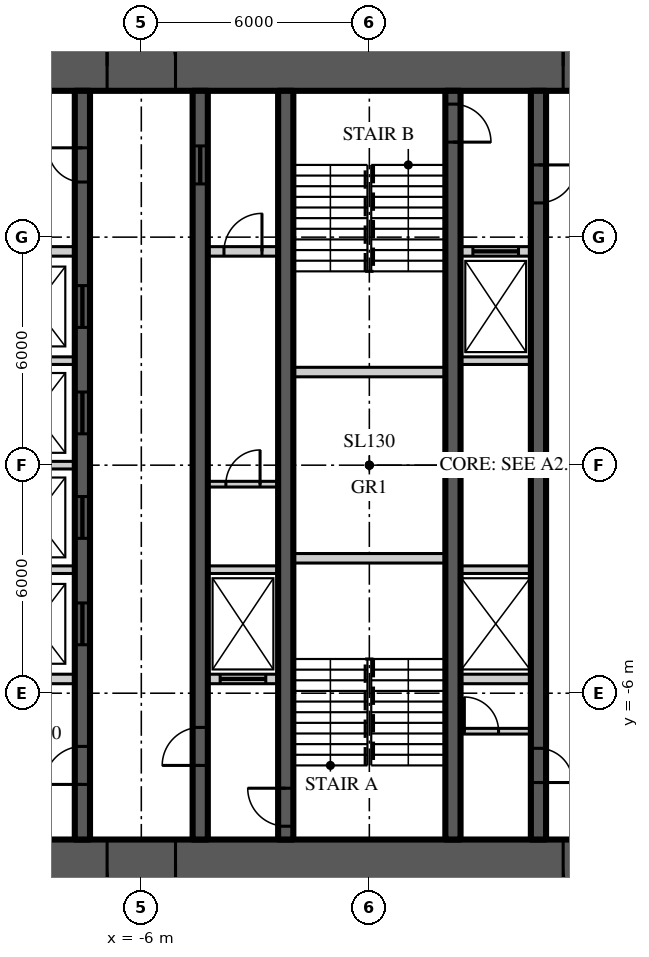
"""IFC4 building model, lengths in metres.
Left out: names, types, materials, properties, quantities, classifications, styles, units other than length and angle.
Written with IfcOpenShell. Run it as: python <this file> out.ifc"""

import sys

from ifc_helpers import new_model, si_unit, direction, frame, frame_2d, origin, place, context, subcontext, project, spatial, rectangle, extrude, element, fill, save


model = new_model("IFC4")
c1 = context("Model", 3, precision=1e-05, world=origin(), true_north=direction((0.0, 1.0)))
c2 = subcontext(c1, "Body", "Model", "MODEL_VIEW")
j1 = project(units=[si_unit("LENGTHUNIT", "METRE"), si_unit("PLANEANGLEUNIT", "RADIAN")], contexts=[c1])
p1 = place(None, origin())
s1 = spatial("IfcSite", under=j1, at=p1, CompositionType="ELEMENT")
p2 = place(p1, origin())
s2 = spatial("IfcBuilding", under=s1, at=p2, CompositionType="ELEMENT")
p3 = place(p2, frame((0.0, 0.0, 98.1)))
s3 = spatial("IfcBuildingStorey", under=s2, at=p3, CompositionType="ELEMENT", Elevation=98.1)
p4 = place(p3, frame((-11.15, 10.5, 0.0), z_axis=(0.0, 0.0, 1.0), x_axis=(1.0, 0.0, 0.0)))
e1 = element("IfcWall", 1, at=p4, inside=s3, PredefinedType="SHEAR", context=c2, shape_type="SweptSolid", body=[
    extrude(rectangle(XDim=22.3, YDim=1.3, at=frame_2d((11.15, 0.0))), origin(), (0.0, 0.0, 1.0), 3.9),
])
p5 = place(p4, frame((4.25, 0.0, 0.0)))
e2 = element("IfcOpeningElement", 2, at=p5, cuts=e1, PredefinedType="OPENING", context=c2, shape_type="SweptSolid", body=[
    extrude(rectangle(XDim=1.8, YDim=2.2, at=frame_2d((0.9, 1.1))), frame((0.0, 0.66, 0.0), z_axis=(0.0, -1.0, 0.0), x_axis=(1.0, 0.0, 0.0)), (0.0, 0.0, 1.0), 1.32),
])
p6 = place(p4, frame((16.25, 0.0, 0.0)))
e3 = element("IfcOpeningElement", 3, at=p6, cuts=e1, PredefinedType="OPENING", context=c2, shape_type="SweptSolid", body=[
    extrude(rectangle(XDim=1.8, YDim=2.2, at=frame_2d((0.9, 1.1))), frame((0.0, 0.66, 0.0), z_axis=(0.0, -1.0, 0.0), x_axis=(1.0, 0.0, 0.0)), (0.0, 0.0, 1.0), 1.32),
])
p7 = place(p3, frame((11.15, -10.5, 0.0), z_axis=(0.0, 0.0, 1.0), x_axis=(-1.0, 0.0, 0.0)))
e4 = element("IfcWall", 4, at=p7, inside=s3, PredefinedType="SHEAR", context=c2, shape_type="SweptSolid", body=[
    extrude(rectangle(XDim=22.3, YDim=1.3, at=frame_2d((11.15, 0.0))), origin(), (0.0, 0.0, 1.0), 3.9),
])
p8 = place(p7, frame((16.25, 0.0, 0.0)))
e5 = element("IfcOpeningElement", 5, at=p8, cuts=e4, PredefinedType="OPENING", context=c2, shape_type="SweptSolid", body=[
    extrude(rectangle(XDim=1.8, YDim=2.2, at=frame_2d((0.9, 1.1))), frame((0.0, 0.66, 0.0), z_axis=(0.0, -1.0, 0.0), x_axis=(1.0, 0.0, 0.0)), (0.0, 0.0, 1.0), 1.32),
])
p9 = place(p7, frame((4.25, 0.0, 0.0)))
e6 = element("IfcOpeningElement", 6, at=p9, cuts=e4, PredefinedType="OPENING", context=c2, shape_type="SweptSolid", body=[
    extrude(rectangle(XDim=1.8, YDim=2.2, at=frame_2d((0.9, 1.1))), frame((0.0, 0.66, 0.0), z_axis=(0.0, -1.0, 0.0), x_axis=(1.0, 0.0, 0.0)), (0.0, 0.0, 1.0), 1.32),
])
p10 = place(p3, frame((-7.55, -9.85, 0.0), z_axis=(0.0, 0.0, 1.0), x_axis=(0.0, 1.0, 0.0)))
e7 = element("IfcWall", 7, at=p10, inside=s3, PredefinedType="SHEAR", context=c2, shape_type="SweptSolid", body=[
    extrude(rectangle(XDim=19.7, YDim=0.4, at=frame_2d((9.85, 0.0))), origin(), (0.0, 0.0, 1.0), 3.9),
])
p11 = place(p10, frame((1.45, 0.0, 0.0)))
e8 = element("IfcOpeningElement", 8, at=p11, cuts=e7, PredefinedType="OPENING", context=c2, shape_type="SweptSolid", body=[
    extrude(rectangle(XDim=1.0, YDim=2.2, at=frame_2d((0.5, 1.1))), frame((0.0, 0.21, 0.0), z_axis=(0.0, -1.0, 0.0), x_axis=(1.0, 0.0, 0.0)), (0.0, 0.0, 1.0), 0.42),
])
p12 = place(p10, frame((17.3, 0.0, 0.0)))
e9 = element("IfcOpeningElement", 9, at=p12, cuts=e7, PredefinedType="OPENING", context=c2, shape_type="SweptSolid", body=[
    extrude(rectangle(XDim=0.9, YDim=2.1, at=frame_2d((0.45, 1.05))), frame((0.0, 0.21, 0.0), z_axis=(0.0, -1.0, 0.0), x_axis=(1.0, 0.0, 0.0)), (0.0, 0.0, 1.0), 0.42),
])
p13 = place(p10, frame((5.125, 0.0, 0.0)))
e10 = element("IfcOpeningElement", 10, at=p13, cuts=e7, PredefinedType="OPENING", context=c2, shape_type="SweptSolid", body=[
    extrude(rectangle(XDim=1.1, YDim=2.2, at=frame_2d((0.55, 1.1))), frame((0.0, 0.21, 0.0), z_axis=(0.0, -1.0, 0.0), x_axis=(1.0, 0.0, 0.0)), (0.0, 0.0, 1.0), 0.42),
])
p14 = place(p10, frame((7.925, 0.0, 0.0)))
e11 = element("IfcOpeningElement", 11, at=p14, cuts=e7, PredefinedType="OPENING", context=c2, shape_type="SweptSolid", body=[
    extrude(rectangle(XDim=1.1, YDim=2.2, at=frame_2d((0.55, 1.1))), frame((0.0, 0.21, 0.0), z_axis=(0.0, -1.0, 0.0), x_axis=(1.0, 0.0, 0.0)), (0.0, 0.0, 1.0), 0.42),
])
p15 = place(p10, frame((10.675, 0.0, 0.0)))
e12 = element("IfcOpeningElement", 12, at=p15, cuts=e7, PredefinedType="OPENING", context=c2, shape_type="SweptSolid", body=[
    extrude(rectangle(XDim=1.1, YDim=2.2, at=frame_2d((0.55, 1.1))), frame((0.0, 0.21, 0.0), z_axis=(0.0, -1.0, 0.0), x_axis=(1.0, 0.0, 0.0)), (0.0, 0.0, 1.0), 0.42),
])
p16 = place(p10, frame((13.475, 0.0, 0.0)))
e13 = element("IfcOpeningElement", 13, at=p16, cuts=e7, PredefinedType="OPENING", context=c2, shape_type="SweptSolid", body=[
    extrude(rectangle(XDim=1.1, YDim=2.2, at=frame_2d((0.55, 1.1))), frame((0.0, 0.21, 0.0), z_axis=(0.0, -1.0, 0.0), x_axis=(1.0, 0.0, 0.0)), (0.0, 0.0, 1.0), 0.42),
])
p17 = place(p3, frame((-4.45, -9.85, 0.0), z_axis=(0.0, 0.0, 1.0), x_axis=(0.0, 1.0, 0.0)))
e14 = element("IfcWall", 14, at=p17, inside=s3, PredefinedType="SHEAR", context=c2, shape_type="SweptSolid", body=[
    extrude(rectangle(XDim=19.7, YDim=0.4, at=frame_2d((9.85, 0.0))), origin(), (0.0, 0.0, 1.0), 3.9),
])
p18 = place(p17, frame((1.95, 0.0, 0.0)))
e15 = element("IfcOpeningElement", 15, at=p18, cuts=e14, PredefinedType="OPENING", context=c2, shape_type="SweptSolid", body=[
    extrude(rectangle(XDim=1.0, YDim=2.2, at=frame_2d((0.5, 1.1))), frame((0.0, 0.21, 0.0), z_axis=(0.0, -1.0, 0.0), x_axis=(1.0, 0.0, 0.0)), (0.0, 0.0, 1.0), 0.42),
])
p19 = place(p17, frame((17.25, 0.0, 0.0)))
e16 = element("IfcOpeningElement", 16, at=p19, cuts=e14, PredefinedType="OPENING", context=c2, shape_type="SweptSolid", body=[
    extrude(rectangle(XDim=1.0, YDim=2.1, at=frame_2d((0.5, 1.05))), frame((0.0, 0.21, 0.0), z_axis=(0.0, -1.0, 0.0), x_axis=(1.0, 0.0, 0.0)), (0.0, 0.0, 1.0), 0.42),
])
p20 = place(p3, frame((4.45, 9.85, 0.0), z_axis=(0.0, 0.0, 1.0), x_axis=(0.0, -1.0, 0.0)))
e17 = element("IfcWall", 17, at=p20, inside=s3, PredefinedType="SHEAR", context=c2, shape_type="SweptSolid", body=[
    extrude(rectangle(XDim=19.7, YDim=0.4, at=frame_2d((9.85, 0.0))), origin(), (0.0, 0.0, 1.0), 3.9),
])
p21 = place(p20, frame((1.95, 0.0, 0.0)))
e18 = element("IfcOpeningElement", 18, at=p21, cuts=e17, PredefinedType="OPENING", context=c2, shape_type="SweptSolid", body=[
    extrude(rectangle(XDim=1.0, YDim=2.2, at=frame_2d((0.5, 1.1))), frame((0.0, 0.21, 0.0), z_axis=(0.0, -1.0, 0.0), x_axis=(1.0, 0.0, 0.0)), (0.0, 0.0, 1.0), 0.42),
])
p22 = place(p20, frame((17.3, 0.0, 0.0)))
e19 = element("IfcOpeningElement", 19, at=p22, cuts=e17, PredefinedType="OPENING", context=c2, shape_type="SweptSolid", body=[
    extrude(rectangle(XDim=0.9, YDim=2.1, at=frame_2d((0.45, 1.05))), frame((0.0, 0.21, 0.0), z_axis=(0.0, -1.0, 0.0), x_axis=(1.0, 0.0, 0.0)), (0.0, 0.0, 1.0), 0.42),
])
p23 = place(p3, frame((-2.2, -9.85, 0.0), z_axis=(0.0, 0.0, 1.0), x_axis=(0.0, 1.0, 0.0)))
e20 = element("IfcWall", 20, at=p23, inside=s3, PredefinedType="SHEAR", context=c2, shape_type="SweptSolid", body=[
    extrude(rectangle(XDim=19.7, YDim=0.4, at=frame_2d((9.85, 0.0))), origin(), (0.0, 0.0, 1.0), 3.9),
])
p24 = place(p23, frame((0.35, 0.0, 0.0)))
e21 = element("IfcOpeningElement", 21, at=p24, cuts=e20, PredefinedType="OPENING", context=c2, shape_type="SweptSolid", body=[
    extrude(rectangle(XDim=1.0, YDim=2.2, at=frame_2d((0.5, 1.1))), frame((0.0, 0.21, 0.0), z_axis=(0.0, -1.0, 0.0), x_axis=(1.0, 0.0, 0.0)), (0.0, 0.0, 1.0), 0.42),
])
p25 = place(p3, frame((2.2, 9.85, 0.0), z_axis=(0.0, 0.0, 1.0), x_axis=(0.0, -1.0, 0.0)))
e22 = element("IfcWall", 22, at=p25, inside=s3, PredefinedType="SHEAR", context=c2, shape_type="SweptSolid", body=[
    extrude(rectangle(XDim=19.7, YDim=0.4, at=frame_2d((9.85, 0.0))), origin(), (0.0, 0.0, 1.0), 3.9),
])
p26 = place(p25, frame((0.35, 0.0, 0.0)))
e23 = element("IfcOpeningElement", 23, at=p26, cuts=e22, PredefinedType="OPENING", context=c2, shape_type="SweptSolid", body=[
    extrude(rectangle(XDim=1.0, YDim=2.2, at=frame_2d((0.5, 1.1))), frame((0.0, 0.21, 0.0), z_axis=(0.0, -1.0, 0.0), x_axis=(1.0, 0.0, 0.0)), (0.0, 0.0, 1.0), 0.42),
])
p27 = place(p3, frame((-9.85, 5.625, 0.0), z_axis=(0.0, 0.0, 1.0), x_axis=(1.0, 0.0, 0.0)))
e24 = element("IfcWall", 24, at=p27, inside=s3, PredefinedType="SOLIDWALL", context=c2, shape_type="SweptSolid", body=[
    extrude(rectangle(XDim=2.1, YDim=0.25, at=frame_2d((1.05, 0.0))), origin(), (0.0, 0.0, 1.0), 3.7),
])
p28 = place(p3, frame((-4.25, 5.625, 0.0), z_axis=(0.0, 0.0, 1.0), x_axis=(1.0, 0.0, 0.0)))
e25 = element("IfcWall", 25, at=p28, inside=s3, PredefinedType="SOLIDWALL", context=c2, shape_type="SweptSolid", body=[
    extrude(rectangle(XDim=1.85, YDim=0.25, at=frame_2d((0.925, 0.0))), origin(), (0.0, 0.0, 1.0), 3.7),
])
p29 = place(p28, frame((0.425, 0.0, 0.0)))
e26 = element("IfcOpeningElement", 26, at=p29, cuts=e25, PredefinedType="OPENING", context=c2, shape_type="SweptSolid", body=[
    extrude(rectangle(XDim=1.0, YDim=2.2, at=frame_2d((0.5, 1.1))), frame((0.0, 0.135, 0.0), z_axis=(0.0, -1.0, 0.0), x_axis=(1.0, 0.0, 0.0)), (0.0, 0.0, 1.0), 0.27),
])
p30 = place(p3, frame((2.4, 5.625, 0.0), z_axis=(0.0, 0.0, 1.0), x_axis=(1.0, 0.0, 0.0)))
e27 = element("IfcWall", 27, at=p30, inside=s3, PredefinedType="SOLIDWALL", context=c2, shape_type="SweptSolid", body=[
    extrude(rectangle(XDim=1.85, YDim=0.25, at=frame_2d((0.925, 0.0))), origin(), (0.0, 0.0, 1.0), 3.7),
])
p31 = place(p30, frame((0.325, 0.0, 0.0)))
e28 = element("IfcOpeningElement", 28, at=p31, cuts=e27, PredefinedType="OPENING", context=c2, shape_type="SweptSolid", body=[
    extrude(rectangle(XDim=1.2, YDim=2.2, at=frame_2d((0.6, 1.1))), frame((0.0, 0.135, 0.0), z_axis=(0.0, -1.0, 0.0), x_axis=(1.0, 0.0, 0.0)), (0.0, 0.0, 1.0), 0.27),
])
p32 = place(p3, frame((-9.85, -5.625, 0.0), z_axis=(0.0, 0.0, 1.0), x_axis=(1.0, 0.0, 0.0)))
e29 = element("IfcWall", 29, at=p32, inside=s3, PredefinedType="SOLIDWALL", context=c2, shape_type="SweptSolid", body=[
    extrude(rectangle(XDim=2.1, YDim=0.25, at=frame_2d((1.05, 0.0))), origin(), (0.0, 0.0, 1.0), 3.7),
])
p33 = place(p3, frame((-4.25, -5.625, 0.0), z_axis=(0.0, 0.0, 1.0), x_axis=(1.0, 0.0, 0.0)))
e30 = element("IfcWall", 30, at=p33, inside=s3, PredefinedType="SOLIDWALL", context=c2, shape_type="SweptSolid", body=[
    extrude(rectangle(XDim=1.85, YDim=0.25, at=frame_2d((0.925, 0.0))), origin(), (0.0, 0.0, 1.0), 3.7),
])
p34 = place(p33, frame((0.325, 0.0, 0.0)))
e31 = element("IfcOpeningElement", 31, at=p34, cuts=e30, PredefinedType="OPENING", context=c2, shape_type="SweptSolid", body=[
    extrude(rectangle(XDim=1.2, YDim=2.2, at=frame_2d((0.6, 1.1))), frame((0.0, 0.135, 0.0), z_axis=(0.0, -1.0, 0.0), x_axis=(1.0, 0.0, 0.0)), (0.0, 0.0, 1.0), 0.27),
])
p35 = place(p3, frame((2.4, -5.625, 0.0), z_axis=(0.0, 0.0, 1.0), x_axis=(1.0, 0.0, 0.0)))
e32 = element("IfcWall", 32, at=p35, inside=s3, PredefinedType="SOLIDWALL", context=c2, shape_type="SweptSolid", body=[
    extrude(rectangle(XDim=1.85, YDim=0.25, at=frame_2d((0.925, 0.0))), origin(), (0.0, 0.0, 1.0), 3.7),
])
for number, where, z_axis, x_axis in (
    (33, (-2.0, -2.45, 0.0), (0.0, 0.0, 1.0), (1.0, 0.0, 0.0)),
    (34, (-2.0, 2.45, 0.0), (0.0, 0.0, 1.0), (1.0, 0.0, 0.0)),
):
    element("IfcWall", number, at=place(p3, frame(where, z_axis=z_axis, x_axis=x_axis)), inside=s3, PredefinedType="SOLIDWALL", context=c2, shape_type="SweptSolid", body=[
        extrude(rectangle(XDim=4.0, YDim=0.25, at=frame_2d((2.0, 0.0))), origin(), (0.0, 0.0, 1.0), 3.7),
    ])
p36 = place(p3, frame((-9.85, -2.75, 0.0), z_axis=(0.0, 0.0, 1.0), x_axis=(1.0, 0.0, 0.0)))
e35 = element("IfcWall", 35, at=p36, inside=s3, PredefinedType="SOLIDWALL", context=c2, shape_type="SweptSolid", body=[
    extrude(rectangle(XDim=2.1, YDim=0.2, at=frame_2d((1.05, 0.0))), origin(), (0.0, 0.0, 1.0), 3.7),
])
for number, where, z_axis, x_axis in (
    (36, (-4.25, -2.75, 0.0), (0.0, 0.0, 1.0), (1.0, 0.0, 0.0)),
    (37, (2.4, -2.75, 0.0), (0.0, 0.0, 1.0), (1.0, 0.0, 0.0)),
):
    element("IfcWall", number, at=place(p3, frame(where, z_axis=z_axis, x_axis=x_axis)), inside=s3, PredefinedType="SOLIDWALL", context=c2, shape_type="SweptSolid", body=[
        extrude(rectangle(XDim=1.85, YDim=0.2, at=frame_2d((0.925, 0.0))), origin(), (0.0, 0.0, 1.0), 3.7),
    ])
for number, where, z_axis, x_axis in (
    (38, (-9.85, 0.0, 0.0), (0.0, 0.0, 1.0), (1.0, 0.0, 0.0)),
    (39, (-9.85, 2.75, 0.0), (0.0, 0.0, 1.0), (1.0, 0.0, 0.0)),
):
    element("IfcWall", number, at=place(p3, frame(where, z_axis=z_axis, x_axis=x_axis)), inside=s3, PredefinedType="SOLIDWALL", context=c2, shape_type="SweptSolid", body=[
        extrude(rectangle(XDim=2.1, YDim=0.2, at=frame_2d((1.05, 0.0))), origin(), (0.0, 0.0, 1.0), 3.7),
    ])
p37 = place(p3, frame((2.4, 2.75, 0.0), z_axis=(0.0, 0.0, 1.0), x_axis=(1.0, 0.0, 0.0)))
e40 = element("IfcWall", 40, at=p37, inside=s3, PredefinedType="SOLIDWALL", context=c2, shape_type="SweptSolid", body=[
    extrude(rectangle(XDim=1.85, YDim=0.2, at=frame_2d((0.925, 0.0))), origin(), (0.0, 0.0, 1.0), 3.7),
])
p38 = place(p3, frame((-4.25, -0.5, 0.0), z_axis=(0.0, 0.0, 1.0), x_axis=(1.0, 0.0, 0.0)))
e41 = element("IfcWall", 41, at=p38, inside=s3, PredefinedType="SOLIDWALL", context=c2, shape_type="SweptSolid", body=[
    extrude(rectangle(XDim=1.85, YDim=0.15, at=frame_2d((0.925, 0.0))), origin(), (0.0, 0.0, 1.0), 3.77),
])
p39 = place(p38, frame((0.475, 0.0, 0.0)))
e42 = element("IfcOpeningElement", 42, at=p39, cuts=e41, PredefinedType="OPENING", context=c2, shape_type="SweptSolid", body=[
    extrude(rectangle(XDim=0.9, YDim=2.1, at=frame_2d((0.45, 1.05))), frame((0.0, 0.085, 0.0), z_axis=(0.0, -1.0, 0.0), x_axis=(1.0, 0.0, 0.0)), (0.0, 0.0, 1.0), 0.17),
])
p40 = place(p3, frame((2.4, -7.0, 0.0), z_axis=(0.0, 0.0, 1.0), x_axis=(1.0, 0.0, 0.0)))
e43 = element("IfcWall", 43, at=p40, inside=s3, PredefinedType="SOLIDWALL", context=c2, shape_type="SweptSolid", body=[
    extrude(rectangle(XDim=1.85, YDim=0.15, at=frame_2d((0.925, 0.0))), origin(), (0.0, 0.0, 1.0), 3.77),
])
p41 = place(p40, frame((0.1, 0.0, 0.0)))
e44 = element("IfcOpeningElement", 44, at=p41, cuts=e43, PredefinedType="OPENING", context=c2, shape_type="SweptSolid", body=[
    extrude(rectangle(XDim=0.9, YDim=2.1, at=frame_2d((0.45, 1.05))), frame((0.0, 0.085, 0.0), z_axis=(0.0, -1.0, 0.0), x_axis=(1.0, 0.0, 0.0)), (0.0, 0.0, 1.0), 0.17),
])
p42 = place(p5, origin())
e45 = element("IfcDoor", 45, at=p42, inside=s3, OperationType="DOUBLE_DOOR_DOUBLE_SWING", PredefinedType="DOOR", context=c2, shape_type="SweptSolid", body=[
    extrude(rectangle(XDim=1.8, YDim=2.2, at=frame_2d((0.9, 1.1))), frame((0.0, 0.025, 0.0), z_axis=(0.0, -1.0, 0.0), x_axis=(1.0, 0.0, 0.0)), (0.0, 0.0, 1.0), 0.05),
])
fill(e2, e45)
p43 = place(p8, origin())
e46 = element("IfcDoor", 46, at=p43, inside=s3, OperationType="DOUBLE_DOOR_DOUBLE_SWING", PredefinedType="DOOR", context=c2, shape_type="SweptSolid", body=[
    extrude(rectangle(XDim=1.8, YDim=2.2, at=frame_2d((0.9, 1.1))), frame((0.0, 0.025, 0.0), z_axis=(0.0, -1.0, 0.0), x_axis=(1.0, 0.0, 0.0)), (0.0, 0.0, 1.0), 0.05),
])
fill(e5, e46)
p44 = place(p6, origin())
e47 = element("IfcDoor", 47, at=p44, inside=s3, OperationType="DOUBLE_DOOR_DOUBLE_SWING", PredefinedType="DOOR", context=c2, shape_type="SweptSolid", body=[
    extrude(rectangle(XDim=1.8, YDim=2.2, at=frame_2d((0.9, 1.1))), frame((0.0, 0.025, 0.0), z_axis=(0.0, -1.0, 0.0), x_axis=(1.0, 0.0, 0.0)), (0.0, 0.0, 1.0), 0.05),
])
fill(e3, e47)
p45 = place(p9, origin())
e48 = element("IfcDoor", 48, at=p45, inside=s3, OperationType="DOUBLE_DOOR_DOUBLE_SWING", PredefinedType="DOOR", context=c2, shape_type="SweptSolid", body=[
    extrude(rectangle(XDim=1.8, YDim=2.2, at=frame_2d((0.9, 1.1))), frame((0.0, 0.025, 0.0), z_axis=(0.0, -1.0, 0.0), x_axis=(1.0, 0.0, 0.0)), (0.0, 0.0, 1.0), 0.05),
])
fill(e6, e48)
p46 = place(p11, origin())
e49 = element("IfcDoor", 49, at=p46, inside=s3, OperationType="SINGLE_SWING_LEFT", PredefinedType="DOOR", context=c2, shape_type="SweptSolid", body=[
    extrude(rectangle(XDim=1.0, YDim=2.2, at=frame_2d((0.5, 1.1))), frame((0.0, 0.025, 0.0), z_axis=(0.0, -1.0, 0.0), x_axis=(1.0, 0.0, 0.0)), (0.0, 0.0, 1.0), 0.05),
])
fill(e8, e49)
p47 = place(p18, origin())
e50 = element("IfcDoor", 50, at=p47, inside=s3, OperationType="SINGLE_SWING_LEFT", PredefinedType="DOOR", context=c2, shape_type="SweptSolid", body=[
    extrude(rectangle(XDim=1.0, YDim=2.2, at=frame_2d((0.5, 1.1))), frame((0.0, 0.025, 0.0), z_axis=(0.0, -1.0, 0.0), x_axis=(1.0, 0.0, 0.0)), (0.0, 0.0, 1.0), 0.05),
])
fill(e15, e50)
p48 = place(p24, origin())
e51 = element("IfcDoor", 51, at=p48, inside=s3, OperationType="SINGLE_SWING_RIGHT", PredefinedType="DOOR", context=c2, shape_type="SweptSolid", body=[
    extrude(rectangle(XDim=1.0, YDim=2.2, at=frame_2d((0.5, 1.1))), frame((0.0, 0.025, 0.0), z_axis=(0.0, -1.0, 0.0), x_axis=(1.0, 0.0, 0.0)), (0.0, 0.0, 1.0), 0.05),
])
fill(e21, e51)
p49 = place(p21, origin())
e52 = element("IfcDoor", 52, at=p49, inside=s3, OperationType="SINGLE_SWING_LEFT", PredefinedType="DOOR", context=c2, shape_type="SweptSolid", body=[
    extrude(rectangle(XDim=1.0, YDim=2.2, at=frame_2d((0.5, 1.1))), frame((0.0, 0.025, 0.0), z_axis=(0.0, -1.0, 0.0), x_axis=(1.0, 0.0, 0.0)), (0.0, 0.0, 1.0), 0.05),
])
fill(e18, e52)
p50 = place(p26, origin())
e53 = element("IfcDoor", 53, at=p50, inside=s3, OperationType="SINGLE_SWING_RIGHT", PredefinedType="DOOR", context=c2, shape_type="SweptSolid", body=[
    extrude(rectangle(XDim=1.0, YDim=2.2, at=frame_2d((0.5, 1.1))), frame((0.0, 0.025, 0.0), z_axis=(0.0, -1.0, 0.0), x_axis=(1.0, 0.0, 0.0)), (0.0, 0.0, 1.0), 0.05),
])
fill(e23, e53)
p51 = place(p12, origin())
e54 = element("IfcDoor", 54, at=p51, inside=s3, OperationType="SINGLE_SWING_RIGHT", PredefinedType="DOOR", context=c2, shape_type="SweptSolid", body=[
    extrude(rectangle(XDim=0.9, YDim=2.1, at=frame_2d((0.45, 1.05))), frame((0.0, 0.025, 0.0), z_axis=(0.0, -1.0, 0.0), x_axis=(1.0, 0.0, 0.0)), (0.0, 0.0, 1.0), 0.05),
])
fill(e9, e54)
p52 = place(p19, origin())
e55 = element("IfcDoor", 55, at=p52, inside=s3, OperationType="SLIDING_TO_LEFT", PredefinedType="DOOR", context=c2, shape_type="SweptSolid", body=[
    extrude(rectangle(XDim=1.0, YDim=2.1, at=frame_2d((0.5, 1.05))), frame((0.0, 0.025, 0.0), z_axis=(0.0, -1.0, 0.0), x_axis=(1.0, 0.0, 0.0)), (0.0, 0.0, 1.0), 0.05),
])
fill(e16, e55)
p53 = place(p22, origin())
e56 = element("IfcDoor", 56, at=p53, inside=s3, OperationType="SINGLE_SWING_RIGHT", PredefinedType="DOOR", context=c2, shape_type="SweptSolid", body=[
    extrude(rectangle(XDim=0.9, YDim=2.1, at=frame_2d((0.45, 1.05))), frame((0.0, 0.025, 0.0), z_axis=(0.0, -1.0, 0.0), x_axis=(1.0, 0.0, 0.0)), (0.0, 0.0, 1.0), 0.05),
])
fill(e19, e56)
p54 = place(p13, origin())
e57 = element("IfcDoor", 57, at=p54, inside=s3, OperationType="SLIDING_TO_LEFT", PredefinedType="DOOR", context=c2, shape_type="SweptSolid", body=[
    extrude(rectangle(XDim=1.1, YDim=2.2, at=frame_2d((0.55, 1.1))), frame((0.0, 0.025, 0.0), z_axis=(0.0, -1.0, 0.0), x_axis=(1.0, 0.0, 0.0)), (0.0, 0.0, 1.0), 0.05),
])
fill(e10, e57)
p55 = place(p14, origin())
e58 = element("IfcDoor", 58, at=p55, inside=s3, OperationType="SLIDING_TO_LEFT", PredefinedType="DOOR", context=c2, shape_type="SweptSolid", body=[
    extrude(rectangle(XDim=1.1, YDim=2.2, at=frame_2d((0.55, 1.1))), frame((0.0, 0.025, 0.0), z_axis=(0.0, -1.0, 0.0), x_axis=(1.0, 0.0, 0.0)), (0.0, 0.0, 1.0), 0.05),
])
fill(e11, e58)
p56 = place(p15, origin())
e59 = element("IfcDoor", 59, at=p56, inside=s3, OperationType="SLIDING_TO_LEFT", PredefinedType="DOOR", context=c2, shape_type="SweptSolid", body=[
    extrude(rectangle(XDim=1.1, YDim=2.2, at=frame_2d((0.55, 1.1))), frame((0.0, 0.025, 0.0), z_axis=(0.0, -1.0, 0.0), x_axis=(1.0, 0.0, 0.0)), (0.0, 0.0, 1.0), 0.05),
])
fill(e12, e59)
p57 = place(p16, origin())
e60 = element("IfcDoor", 60, at=p57, inside=s3, OperationType="SLIDING_TO_LEFT", PredefinedType="DOOR", context=c2, shape_type="SweptSolid", body=[
    extrude(rectangle(XDim=1.1, YDim=2.2, at=frame_2d((0.55, 1.1))), frame((0.0, 0.025, 0.0), z_axis=(0.0, -1.0, 0.0), x_axis=(1.0, 0.0, 0.0)), (0.0, 0.0, 1.0), 0.05),
])
fill(e13, e60)
p58 = place(p34, origin())
e61 = element("IfcDoor", 61, at=p58, inside=s3, OperationType="SLIDING_TO_LEFT", PredefinedType="DOOR", context=c2, shape_type="SweptSolid", body=[
    extrude(rectangle(XDim=1.2, YDim=2.2, at=frame_2d((0.6, 1.1))), frame((0.0, 0.025, 0.0), z_axis=(0.0, -1.0, 0.0), x_axis=(1.0, 0.0, 0.0)), (0.0, 0.0, 1.0), 0.05),
])
fill(e31, e61)
p59 = place(p31, origin())
e62 = element("IfcDoor", 62, at=p59, inside=s3, OperationType="SLIDING_TO_LEFT", PredefinedType="DOOR", context=c2, shape_type="SweptSolid", body=[
    extrude(rectangle(XDim=1.2, YDim=2.2, at=frame_2d((0.6, 1.1))), frame((0.0, 0.025, 0.0), z_axis=(0.0, -1.0, 0.0), x_axis=(1.0, 0.0, 0.0)), (0.0, 0.0, 1.0), 0.05),
])
fill(e28, e62)
p60 = place(p39, origin())
e63 = element("IfcDoor", 63, at=p60, inside=s3, OperationType="SINGLE_SWING_RIGHT", PredefinedType="DOOR", context=c2, shape_type="SweptSolid", body=[
    extrude(rectangle(XDim=0.9, YDim=2.1, at=frame_2d((0.45, 1.05))), frame((0.0, 0.025, 0.0), z_axis=(0.0, -1.0, 0.0), x_axis=(1.0, 0.0, 0.0)), (0.0, 0.0, 1.0), 0.05),
])
fill(e42, e63)
p61 = place(p29, origin())
e64 = element("IfcDoor", 64, at=p61, inside=s3, OperationType="SINGLE_SWING_RIGHT", PredefinedType="DOOR", context=c2, shape_type="SweptSolid", body=[
    extrude(rectangle(XDim=1.0, YDim=2.2, at=frame_2d((0.5, 1.1))), frame((0.0, 0.025, 0.0), z_axis=(0.0, -1.0, 0.0), x_axis=(1.0, 0.0, 0.0)), (0.0, 0.0, 1.0), 0.05),
])
fill(e26, e64)
p62 = place(p41, origin())
e65 = element("IfcDoor", 65, at=p62, inside=s3, OperationType="SINGLE_SWING_LEFT", PredefinedType="DOOR", context=c2, shape_type="SweptSolid", body=[
    extrude(rectangle(XDim=0.9, YDim=2.1, at=frame_2d((0.45, 1.05))), frame((0.0, 0.025, 0.0), z_axis=(0.0, -1.0, 0.0), x_axis=(1.0, 0.0, 0.0)), (0.0, 0.0, 1.0), 0.05),
])
fill(e44, e65)
save(model, sys.argv[1])
